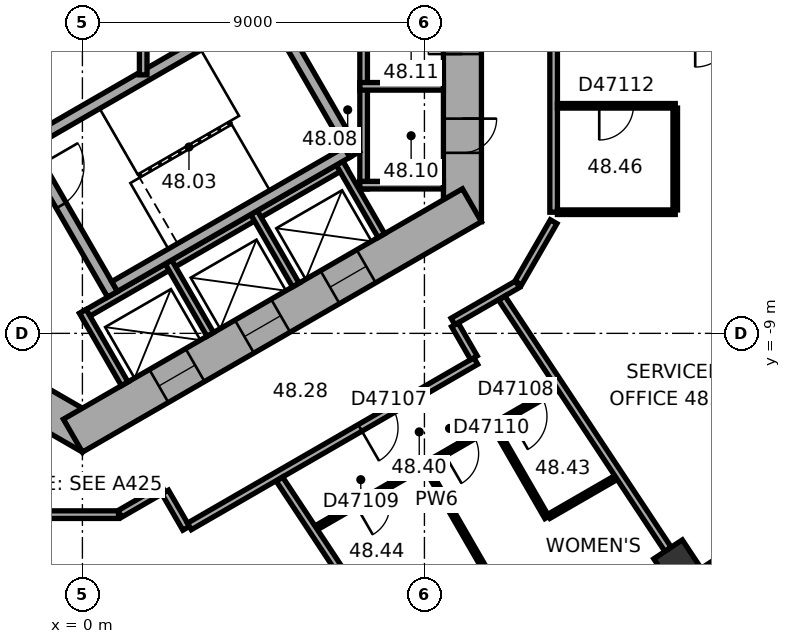
"""IFC4 building model, lengths in metres.
Left out: names, types, materials, properties, quantities, classifications, styles, units other than length and angle.
Written with IfcOpenShell. Run it as: python <this file> out.ifc"""

import sys

from ifc_helpers import new_model, si_unit, direction, frame, frame_2d, origin, origin_2d, place, context, subcontext, project, spatial, rectangle, extrude, element, fill, save


model = new_model("IFC4")
c1 = context("Model", 3, precision=1e-05, world=origin(), true_north=direction((0.0, 1.0)))
c2 = subcontext(c1, "Body", "Model", "MODEL_VIEW")
j1 = project(units=[si_unit("LENGTHUNIT", "METRE"), si_unit("PLANEANGLEUNIT", "RADIAN")], contexts=[c1])
p1 = place(None, origin())
s1 = spatial("IfcSite", under=j1, at=p1, CompositionType="ELEMENT")
p2 = place(p1, origin())
s2 = spatial("IfcBuilding", under=s1, at=p2, CompositionType="ELEMENT")
p3 = place(p2, frame((0.0, 0.0, 194.7)))
s3 = spatial("IfcBuildingStorey", under=s2, at=p3, CompositionType="ELEMENT", Elevation=194.7)
p4 = place(p3, frame((15.659, -15.058, 0.0), z_axis=(0.0, 0.0, 1.0), x_axis=(0.833885822067, 0.551936985312, 0.0)))
e1 = element("IfcColumn", 1, at=p4, inside=s3, PredefinedType="COLUMN", context=c2, shape_type="SweptSolid", body=[
    extrude(rectangle(XDim=0.9, YDim=0.9, at=origin_2d()), origin(), (0.0, 0.0, 1.0), 3.7),
])
p5 = place(p3, frame((10.0, -6.062, 0.0), z_axis=(0.0, 0.0, 1.0), x_axis=(0.0, 1.0, 0.0)))
e2 = element("IfcWall", 2, at=p5, inside=s3, PredefinedType="SHEAR", context=c2, shape_type="SweptSolid", body=[
    extrude(rectangle(XDim=12.125, YDim=1.0, at=frame_2d((6.062, 0.0))), origin(), (0.0, 0.0, 1.0), 3.7),
])
p6 = place(p5, frame((6.262, 0.0, 0.0)))
e3 = element("IfcOpeningElement", 3, at=p6, cuts=e2, PredefinedType="OPENING", context=c2, shape_type="SweptSolid", body=[
    extrude(rectangle(XDim=1.5, YDim=2.1, at=frame_2d((0.75, 1.05))), frame((0.0, 0.51, 0.0), z_axis=(0.0, -1.0, 0.0), x_axis=(1.0, 0.0, 0.0)), (0.0, 0.0, 1.0), 1.02),
])
p7 = place(p5, frame((1.812, 0.0, 0.0)))
e4 = element("IfcOpeningElement", 4, at=p7, cuts=e2, PredefinedType="OPENING", context=c2, shape_type="SweptSolid", body=[
    extrude(rectangle(XDim=0.9, YDim=2.1, at=frame_2d((0.45, 1.05))), frame((0.0, 0.51, 0.0), z_axis=(0.0, -1.0, 0.0), x_axis=(1.0, 0.0, 0.0)), (0.0, 0.0, 1.0), 1.02),
])
p8 = place(p5, frame((4.412, 0.0, 0.0)))
e5 = element("IfcOpeningElement", 5, at=p8, cuts=e2, PredefinedType="OPENING", context=c2, shape_type="SweptSolid", body=[
    extrude(rectangle(XDim=0.9, YDim=2.1, at=frame_2d((0.45, 1.05))), frame((0.0, 0.51, 0.0), z_axis=(0.0, -1.0, 0.0), x_axis=(1.0, 0.0, 0.0)), (0.0, 0.0, 1.0), 1.02),
])
p9 = place(p3, frame((-10.25, -5.629, 0.0), z_axis=(0.0, 0.0, 1.0), x_axis=(0.866022616891, -0.50000482701, 0.0)))
e6 = element("IfcWall", 6, at=p9, inside=s3, PredefinedType="SHEAR", context=c2, shape_type="SweptSolid", body=[
    extrude(rectangle(XDim=12.125, YDim=1.0, at=frame_2d((6.062, 0.0))), origin(), (0.0, 0.0, 1.0), 3.7),
])
p10 = place(p9, frame((6.262, 0.0, 0.0)))
e7 = element("IfcOpeningElement", 7, at=p10, cuts=e6, PredefinedType="OPENING", context=c2, shape_type="SweptSolid", body=[
    extrude(rectangle(XDim=1.5, YDim=2.1, at=frame_2d((0.75, 1.05))), frame((0.0, 0.51, 0.0), z_axis=(0.0, -1.0, 0.0), x_axis=(1.0, 0.0, 0.0)), (0.0, 0.0, 1.0), 1.02),
])
p11 = place(p9, frame((1.712, 0.0, 0.0)))
e8 = element("IfcOpeningElement", 8, at=p11, cuts=e6, PredefinedType="OPENING", context=c2, shape_type="SweptSolid", body=[
    extrude(rectangle(XDim=1.1, YDim=2.1, at=frame_2d((0.55, 1.05))), frame((0.0, 0.51, 0.0), z_axis=(0.0, -1.0, 0.0), x_axis=(1.0, 0.0, 0.0)), (0.0, 0.0, 1.0), 1.02),
])
p12 = place(p9, frame((4.312, 0.0, 0.0)))
e9 = element("IfcOpeningElement", 9, at=p12, cuts=e6, PredefinedType="OPENING", context=c2, shape_type="SweptSolid", body=[
    extrude(rectangle(XDim=1.1, YDim=2.1, at=frame_2d((0.55, 1.05))), frame((0.0, 0.51, 0.0), z_axis=(0.0, -1.0, 0.0), x_axis=(1.0, 0.0, 0.0)), (0.0, 0.0, 1.0), 1.02),
])
p13 = place(p3, frame((-0.25, -11.691, 0.0), z_axis=(0.0, 0.0, 1.0), x_axis=(0.866022616891, 0.50000482701, 0.0)))
e10 = element("IfcWall", 10, at=p13, inside=s3, PredefinedType="SHEAR", context=c2, shape_type="SweptSolid", body=[
    extrude(rectangle(XDim=12.125, YDim=1.0, at=frame_2d((6.062, 0.0))), origin(), (0.0, 0.0, 1.0), 3.7),
])
p14 = place(p13, frame((2.612, 0.0, 0.0)))
e11 = element("IfcOpeningElement", 11, at=p14, cuts=e10, PredefinedType="OPENING", context=c2, shape_type="SweptSolid", body=[
    extrude(rectangle(XDim=1.1, YDim=2.1, at=frame_2d((0.55, 1.05))), frame((0.0, 0.51, 0.0), z_axis=(0.0, -1.0, 0.0), x_axis=(1.0, 0.0, 0.0)), (0.0, 0.0, 1.0), 1.02),
])
p15 = place(p13, frame((5.212, 0.0, 0.0)))
e12 = element("IfcOpeningElement", 12, at=p15, cuts=e10, PredefinedType="OPENING", context=c2, shape_type="SweptSolid", body=[
    extrude(rectangle(XDim=1.1, YDim=2.1, at=frame_2d((0.55, 1.05))), frame((0.0, 0.51, 0.0), z_axis=(0.0, -1.0, 0.0), x_axis=(1.0, 0.0, 0.0)), (0.0, 0.0, 1.0), 1.02),
])
p16 = place(p13, frame((7.812, 0.0, 0.0)))
e13 = element("IfcOpeningElement", 13, at=p16, cuts=e10, PredefinedType="OPENING", context=c2, shape_type="SweptSolid", body=[
    extrude(rectangle(XDim=1.1, YDim=2.1, at=frame_2d((0.55, 1.05))), frame((0.0, 0.51, 0.0), z_axis=(0.0, -1.0, 0.0), x_axis=(1.0, 0.0, 0.0)), (0.0, 0.0, 1.0), 1.02),
])
p17 = place(p3, frame((2.911, -24.156, 0.0), z_axis=(0.0, 0.0, 1.0), x_axis=(0.833882163564, 0.551942512668, 0.0)))
e14 = element("IfcWall", 14, at=p17, inside=s3, PredefinedType="STANDARD", context=c2, shape_type="SweptSolid", body=[
    extrude(rectangle(XDim=20.044, YDim=0.2, at=frame_2d((10.022, 0.0))), origin(), (0.0, 0.0, 1.0), 3.7),
])
p18 = place(p17, frame((1.313, 0.0, 0.9)))
e15 = element("IfcOpeningElement", 15, at=p18, cuts=e14, PredefinedType="OPENING", context=c2, shape_type="SweptSolid", body=[
    extrude(rectangle(XDim=2.4, YDim=2.0, at=frame_2d((1.2, 1.0))), frame((0.0, 0.11, 0.0), z_axis=(0.0, -1.0, 0.0), x_axis=(1.0, 0.0, 0.0)), (0.0, 0.0, 1.0), 0.22),
])
p19 = place(p17, frame((5.067, 0.0, 0.9)))
e16 = element("IfcOpeningElement", 16, at=p19, cuts=e14, PredefinedType="OPENING", context=c2, shape_type="SweptSolid", body=[
    extrude(rectangle(XDim=2.4, YDim=2.0, at=frame_2d((1.2, 1.0))), frame((0.0, 0.11, 0.0), z_axis=(0.0, -1.0, 0.0), x_axis=(1.0, 0.0, 0.0)), (0.0, 0.0, 1.0), 0.22),
])
p20 = place(p17, frame((8.821, 0.0, 0.9)))
e17 = element("IfcOpeningElement", 17, at=p20, cuts=e14, PredefinedType="OPENING", context=c2, shape_type="SweptSolid", body=[
    extrude(rectangle(XDim=2.4, YDim=2.0, at=frame_2d((1.2, 1.0))), frame((0.0, 0.11, 0.0), z_axis=(0.0, -1.0, 0.0), x_axis=(1.0, 0.0, 0.0)), (0.0, 0.0, 1.0), 0.22),
])
p21 = place(p17, frame((12.575, 0.0, 0.9)))
e18 = element("IfcOpeningElement", 18, at=p21, cuts=e14, PredefinedType="OPENING", context=c2, shape_type="SweptSolid", body=[
    extrude(rectangle(XDim=2.4, YDim=2.0, at=frame_2d((1.2, 1.0))), frame((0.0, 0.11, 0.0), z_axis=(0.0, -1.0, 0.0), x_axis=(1.0, 0.0, 0.0)), (0.0, 0.0, 1.0), 0.22),
])
p22 = place(p17, frame((16.329, 0.0, 0.9)))
e19 = element("IfcOpeningElement", 19, at=p22, cuts=e14, PredefinedType="OPENING", context=c2, shape_type="SweptSolid", body=[
    extrude(rectangle(XDim=2.4, YDim=2.0, at=frame_2d((1.2, 1.0))), frame((0.0, 0.11, 0.0), z_axis=(0.0, -1.0, 0.0), x_axis=(1.0, 0.0, 0.0)), (0.0, 0.0, 1.0), 0.22),
])
p23 = place(p3, frame((7.4, -5.2, 0.0), z_axis=(0.0, 0.0, 1.0), x_axis=(0.0, 1.0, 0.0)))
e20 = element("IfcWall", 20, at=p23, inside=s3, PredefinedType="PARTITIONING", context=c2, shape_type="SweptSolid", body=[
    extrude(rectangle(XDim=5.4, YDim=0.2, at=frame_2d((2.7, 0.0))), origin(), (0.0, 0.0, 1.0), 3.42),
])
for number, where, z_axis, x_axis in (
    (21, (7.3, -5.1, 0.0), (0.0, 0.0, 1.0), (1.0, 0.0, 0.0)),
    (22, (7.3, -2.5, 0.0), (0.0, 0.0, 1.0), (1.0, 0.0, 0.0)),
):
    element("IfcWall", number, at=place(p3, frame(where, z_axis=z_axis, x_axis=x_axis)), inside=s3, PredefinedType="PARTITIONING", context=c2, shape_type="SweptSolid", body=[
        extrude(rectangle(XDim=2.2, YDim=0.2, at=frame_2d((1.1, 0.0))), origin(), (0.0, 0.0, 1.0), 3.42),
    ])
p24 = place(p3, frame((-0.024, -8.559, 0.0), z_axis=(0.0, 0.0, 1.0), x_axis=(0.866026010844, 0.49999894854, 0.0)))
e23 = element("IfcWall", 23, at=p24, inside=s3, PredefinedType="PARTITIONING", context=c2, shape_type="SweptSolid", body=[
    extrude(rectangle(XDim=8.0, YDim=0.2, at=frame_2d((4.0, 0.0))), origin(), (0.0, 0.0, 1.0), 3.42),
])
for number, where, z_axis, x_axis in (
    (24, (0.013, -8.422, 0.0), (0.0, 0.0, 1.0), (0.5, -0.866, 0.0)),
    (25, (2.264, -7.122, 0.0), (0.0, 0.0, 1.0), (0.5, -0.866, 0.0)),
    (26, (4.516, -5.822, 0.0), (0.0, 0.0, 1.0), (0.5, -0.866, 0.0)),
    (27, (6.768, -4.522, 0.0), (0.0, 0.0, 1.0), (0.5, -0.866, 0.0)),
):
    element("IfcWall", number, at=place(p3, frame(where, z_axis=z_axis, x_axis=x_axis)), inside=s3, PredefinedType="PARTITIONING", context=c2, shape_type="SweptSolid", body=[
        extrude(rectangle(XDim=2.2, YDim=0.2, at=frame_2d((1.1, 0.0))), origin(), (0.0, 0.0, 1.0), 3.42),
    ])
p25 = place(p3, frame((-1.558, -3.902, 0.0), z_axis=(0.0, 0.0, 1.0), x_axis=(0.499977259774, -0.866038532462, 0.0)))
e28 = element("IfcWall", 28, at=p25, inside=s3, PredefinedType="SHEAR", context=c2, shape_type="SweptSolid", body=[
    extrude(rectangle(XDim=4.7, YDim=0.3, at=frame_2d((2.35, 0.0))), origin(), (0.0, 0.0, 1.0), 3.42),
])
p26 = place(p25, frame((0.8, 0.0, 0.0)))
e29 = element("IfcOpeningElement", 29, at=p26, cuts=e28, PredefinedType="OPENING", context=c2, shape_type="SweptSolid", body=[
    extrude(rectangle(XDim=1.2, YDim=2.1, at=frame_2d((0.6, 1.05))), frame((0.0, 0.16, 0.0), z_axis=(0.0, -1.0, 0.0), x_axis=(1.0, 0.0, 0.0)), (0.0, 0.0, 1.0), 0.32),
])
p27 = place(p3, frame((4.816, -0.222, 0.0), z_axis=(0.0, 0.0, 1.0), x_axis=(0.499977259774, -0.866038532462, 0.0)))
e30 = element("IfcWall", 30, at=p27, inside=s3, PredefinedType="SHEAR", context=c2, shape_type="SweptSolid", body=[
    extrude(rectangle(XDim=4.7, YDim=0.3, at=frame_2d((2.35, 0.0))), origin(), (0.0, 0.0, 1.0), 3.42),
])
for number, where, z_axis, x_axis in (
    (31, (-1.353, -3.957, 0.0), (0.0, 0.0, 1.0), (0.866, 0.5, 0.0)),
    (32, (0.847, -7.767, 0.0), (0.0, 0.0, 1.0), (0.866, 0.5, 0.0)),
):
    element("IfcWall", number, at=place(p3, frame(where, z_axis=z_axis, x_axis=x_axis)), inside=s3, PredefinedType="SHEAR", context=c2, shape_type="SweptSolid", body=[
        extrude(rectangle(XDim=7.06, YDim=0.3, at=frame_2d((3.53, 0.0))), origin(), (0.0, 0.0, 1.0), 3.42),
    ])
p28 = place(p3, frame((1.6, -2.198, 0.0), z_axis=(0.0, 0.0, 1.0), x_axis=(0.0, 1.0, 0.0)))
e33 = element("IfcWall", 33, at=p28, inside=s3, PredefinedType="PARTITIONING", context=c2, shape_type="SweptSolid", body=[
    extrude(rectangle(XDim=4.397, YDim=0.2, at=frame_2d((2.198, 0.0))), origin(), (0.0, 0.0, 1.0), 3.42),
])
p29 = place(p3, frame((-0.91, -13.77, 0.0), z_axis=(0.0, 0.0, 1.0), x_axis=(1.0, 0.0, 0.0)))
e34 = element("IfcWall", 34, at=p29, inside=s3, PredefinedType="PARTITIONING", context=c2, shape_type="SweptSolid", body=[
    extrude(rectangle(XDim=1.86, YDim=0.2, at=frame_2d((0.93, 0.0))), origin(), (0.0, 0.0, 1.0), 3.42),
])
p30 = place(p3, frame((0.985, -13.75, 0.0), z_axis=(0.0, 0.0, 1.0), x_axis=(0.866028661061, 0.499994358189, 0.0)))
e35 = element("IfcWall", 35, at=p30, inside=s3, PredefinedType="PARTITIONING", context=c2, shape_type="SweptSolid", body=[
    extrude(rectangle(XDim=1.321, YDim=0.2, at=frame_2d((0.661, 0.0))), origin(), (0.0, 0.0, 1.0), 3.42),
])
p31 = place(p3, frame((2.179, -13.176, 0.0), z_axis=(0.0, 0.0, 1.0), x_axis=(0.499978356969, -0.866037899034, 0.0)))
e36 = element("IfcWall", 36, at=p31, inside=s3, PredefinedType="PARTITIONING", context=c2, shape_type="SweptSolid", body=[
    extrude(rectangle(XDim=1.101, YDim=0.2, at=frame_2d((0.551, 0.0))), origin(), (0.0, 0.0, 1.0), 3.42),
])
p32 = place(p3, frame((2.816, -14.079, 0.0), z_axis=(0.0, 0.0, 1.0), x_axis=(0.866021128829, 0.500007404367, 0.0)))
e37 = element("IfcWall", 37, at=p32, inside=s3, PredefinedType="PARTITIONING", context=c2, shape_type="SweptSolid", body=[
    extrude(rectangle(XDim=8.702, YDim=0.2, at=frame_2d((4.351, 0.0))), origin(), (0.0, 0.0, 1.0), 3.42),
])
p33 = place(p32, frame((5.184, 0.0, 0.0)))
e38 = element("IfcOpeningElement", 38, at=p33, cuts=e37, PredefinedType="OPENING", context=c2, shape_type="SweptSolid", body=[
    extrude(rectangle(XDim=1.0, YDim=2.1, at=frame_2d((0.5, 1.05))), frame((0.0, 0.11, 0.0), z_axis=(0.0, -1.0, 0.0), x_axis=(1.0, 0.0, 0.0)), (0.0, 0.0, 1.0), 0.22),
])
p34 = place(p3, frame((6.152, -14.116, 0.0), z_axis=(0.0, 0.0, 1.0), x_axis=(0.866026788224, 0.499997602072, 0.0)))
e39 = element("IfcWall", 39, at=p34, inside=s3, PredefinedType="PARTITIONING", context=c2, shape_type="SweptSolid", body=[
    extrude(rectangle(XDim=7.322, YDim=0.12, at=frame_2d((3.661, 0.0))), origin(), (0.0, 0.0, 1.0), 3.42),
])
p35 = place(p34, frame((5.858, 0.0, 0.0)))
e40 = element("IfcOpeningElement", 40, at=p35, cuts=e39, PredefinedType="OPENING", context=c2, shape_type="SweptSolid", body=[
    extrude(rectangle(XDim=1.0, YDim=2.1, at=frame_2d((0.5, 1.05))), frame((0.0, 0.07, 0.0), z_axis=(0.0, -1.0, 0.0), x_axis=(1.0, 0.0, 0.0)), (0.0, 0.0, 1.0), 0.14),
])
p36 = place(p34, frame((1.2, 0.0, 0.0)))
e41 = element("IfcOpeningElement", 41, at=p36, cuts=e39, PredefinedType="OPENING", context=c2, shape_type="SweptSolid", body=[
    extrude(rectangle(XDim=0.9, YDim=2.1, at=frame_2d((0.45, 1.05))), frame((0.0, 0.07, 0.0), z_axis=(0.0, -1.0, 0.0), x_axis=(1.0, 0.0, 0.0)), (0.0, 0.0, 1.0), 0.14),
])
p37 = place(p34, frame((3.897, 0.0, 0.0)))
e42 = element("IfcOpeningElement", 42, at=p37, cuts=e39, PredefinedType="OPENING", context=c2, shape_type="SweptSolid", body=[
    extrude(rectangle(XDim=0.9, YDim=2.1, at=frame_2d((0.45, 1.05))), frame((0.0, 0.07, 0.0), z_axis=(0.0, -1.0, 0.0), x_axis=(1.0, 0.0, 0.0)), (0.0, 0.0, 1.0), 0.14),
])
p38 = place(p3, frame((9.15, -18.827, 0.0), z_axis=(0.0, 0.0, 1.0), x_axis=(-0.551928083938, 0.83389171369, 0.0)))
e43 = element("IfcWall", 43, at=p38, inside=s3, PredefinedType="PARTITIONING", context=c2, shape_type="SweptSolid", body=[
    extrude(rectangle(XDim=7.182, YDim=0.2, at=frame_2d((3.591, 0.0))), origin(), (0.0, 0.0, 1.0), 2.87),
])
p39 = place(p3, frame((9.752, -8.688, 0.0), z_axis=(0.0, 0.0, 1.0), x_axis=(0.865974105138, 0.500088841337, 0.0)))
e44 = element("IfcWall", 44, at=p39, inside=s3, PredefinedType="PARTITIONING", context=c2, shape_type="SweptSolid", body=[
    extrude(rectangle(XDim=1.961, YDim=0.2, at=frame_2d((0.98, 0.0))), origin(), (0.0, 0.0, 1.0), 3.42),
])
p40 = place(p3, frame((10.302, -9.642, 0.0), z_axis=(0.0, 0.0, 1.0), x_axis=(-0.500074377092, 0.865982457891, 0.0)))
e45 = element("IfcWall", 45, at=p40, inside=s3, PredefinedType="PARTITIONING", context=c2, shape_type="SweptSolid", body=[
    extrude(rectangle(XDim=1.001, YDim=0.2, at=frame_2d((0.5, 0.0))), origin(), (0.0, 0.0, 1.0), 3.42),
])
p41 = place(p3, frame((10.853, -11.472, 0.0), z_axis=(0.0, 0.0, 1.0), x_axis=(0.500048966069, -0.865997131366, 0.0)))
e46 = element("IfcWall", 46, at=p41, inside=s3, PredefinedType="PARTITIONING", context=c2, shape_type="SweptSolid", body=[
    extrude(rectangle(XDim=2.74, YDim=0.12, at=frame_2d((1.37, 0.0))), origin(), (0.0, 0.0, 1.0), 3.42),
])
p42 = place(p3, frame((11.47, -7.673, 0.0), z_axis=(0.0, 0.0, 1.0), x_axis=(0.499964847546, 0.866045698112, 0.0)))
e47 = element("IfcWall", 47, at=p42, inside=s3, PredefinedType="PARTITIONING", context=c2, shape_type="SweptSolid", body=[
    extrude(rectangle(XDim=1.86, YDim=0.2, at=frame_2d((0.93, 0.0))), origin(), (0.0, 0.0, 1.0), 3.42),
])
p43 = place(p3, frame((11.705, -17.136, 0.0), z_axis=(0.0, 0.0, 1.0), x_axis=(-0.499985382219, 0.8660338432, 0.0)))
e48 = element("IfcWall", 48, at=p43, inside=s3, PredefinedType="PARTITIONING", context=c2, shape_type="SweptSolid", body=[
    extrude(rectangle(XDim=5.332, YDim=0.12, at=frame_2d((2.666, 0.0))), origin(), (0.0, 0.0, 1.0), 3.42),
])
p44 = place(p3, frame((12.275, -13.814, 0.0), z_axis=(0.0, 0.0, 1.0), x_axis=(0.866010195725, 0.500026340207, 0.0)))
e49 = element("IfcWall", 49, at=p44, inside=s3, PredefinedType="PARTITIONING", context=c2, shape_type="SweptSolid", body=[
    extrude(rectangle(XDim=2.04, YDim=0.12, at=frame_2d((1.02, 0.0))), origin(), (0.0, 0.0, 1.0), 3.42),
])
p45 = place(p3, frame((12.4, -5.812, 0.0), z_axis=(0.0, 0.0, 1.0), x_axis=(0.0, 1.0, 0.0)))
e50 = element("IfcWall", 50, at=p45, inside=s3, PredefinedType="PARTITIONING", context=c2, shape_type="SweptSolid", body=[
    extrude(rectangle(XDim=4.819, YDim=0.2, at=frame_2d((2.41, 0.0))), origin(), (0.0, 0.0, 1.0), 3.42),
])
p46 = place(p3, frame((12.5, -3.012, 0.0), z_axis=(0.0, 0.0, 1.0), x_axis=(1.0, 0.0, 0.0)))
e51 = element("IfcWall", 51, at=p46, inside=s3, PredefinedType="PARTITIONING", context=c2, shape_type="SweptSolid", body=[
    extrude(rectangle(XDim=3.1, YDim=0.12, at=frame_2d((1.55, 0.0))), origin(), (0.0, 0.0, 1.0), 3.42),
])
p47 = place(p46, frame((1.1, 0.0, 0.0)))
e52 = element("IfcOpeningElement", 52, at=p47, cuts=e51, PredefinedType="OPENING", context=c2, shape_type="SweptSolid", body=[
    extrude(rectangle(XDim=0.9, YDim=2.1, at=frame_2d((0.45, 1.05))), frame((0.0, 0.07, 0.0), z_axis=(0.0, -1.0, 0.0), x_axis=(1.0, 0.0, 0.0)), (0.0, 0.0, 1.0), 0.14),
])
p48 = place(p3, frame((15.411, -14.683, 0.0), z_axis=(0.0, 0.0, 1.0), x_axis=(-0.551932106251, 0.833889051427, 0.0)))
e53 = element("IfcWall", 53, at=p48, inside=s3, PredefinedType="PARTITIONING", context=c2, shape_type="SweptSolid", body=[
    extrude(rectangle(XDim=7.926, YDim=0.2, at=frame_2d((3.963, 0.0))), origin(), (0.0, 0.0, 1.0), 2.87),
])
p49 = place(p3, frame((15.6, -5.812, 0.0), z_axis=(0.0, 0.0, 1.0), x_axis=(-1.0, 0.0, 0.0)))
e54 = element("IfcWall", 54, at=p49, inside=s3, PredefinedType="PARTITIONING", context=c2, shape_type="SweptSolid", body=[
    extrude(rectangle(XDim=3.1, YDim=0.12, at=frame_2d((1.55, 0.0))), origin(), (0.0, 0.0, 1.0), 3.42),
])
p50 = place(p3, frame((15.6, -3.072, 0.0), z_axis=(0.0, 0.0, 1.0), x_axis=(0.0, -1.0, 0.0)))
e55 = element("IfcWall", 55, at=p50, inside=s3, PredefinedType="PARTITIONING", context=c2, shape_type="SweptSolid", body=[
    extrude(rectangle(XDim=2.68, YDim=0.12, at=frame_2d((1.34, 0.0))), origin(), (0.0, 0.0, 1.0), 3.42),
])
p51 = place(p22, origin())
e56 = element("IfcWindow", 56, at=p51, inside=s3, PartitioningType="SINGLE_PANEL", PredefinedType="WINDOW", context=c2, shape_type="SweptSolid", body=[
    extrude(rectangle(XDim=2.4, YDim=2.0, at=frame_2d((1.2, 1.0))), frame((0.0, 0.03, 0.0), z_axis=(0.0, -1.0, 0.0), x_axis=(1.0, 0.0, 0.0)), (0.0, 0.0, 1.0), 0.06),
])
fill(e19, e56)
p52 = place(p26, origin())
e57 = element("IfcDoor", 57, at=p52, inside=s3, OperationType="SINGLE_SWING_RIGHT", PredefinedType="DOOR", context=c2, shape_type="SweptSolid", body=[
    extrude(rectangle(XDim=1.2, YDim=2.1, at=frame_2d((0.6, 1.05))), frame((0.0, 0.025, 0.0), z_axis=(0.0, -1.0, 0.0), x_axis=(1.0, 0.0, 0.0)), (0.0, 0.0, 1.0), 0.05),
])
fill(e29, e57)
p53 = place(p7, origin())
e58 = element("IfcDoor", 58, at=p53, inside=s3, OperationType="SINGLE_SWING_LEFT", PredefinedType="DOOR", context=c2, shape_type="SweptSolid", body=[
    extrude(rectangle(XDim=0.9, YDim=2.1, at=frame_2d((0.45, 1.05))), frame((0.0, 0.025, 0.0), z_axis=(0.0, -1.0, 0.0), x_axis=(1.0, 0.0, 0.0)), (0.0, 0.0, 1.0), 0.05),
])
fill(e4, e58)
p54 = place(p8, origin())
e59 = element("IfcDoor", 59, at=p54, inside=s3, OperationType="SINGLE_SWING_LEFT", PredefinedType="DOOR", context=c2, shape_type="SweptSolid", body=[
    extrude(rectangle(XDim=0.9, YDim=2.1, at=frame_2d((0.45, 1.05))), frame((0.0, 0.025, 0.0), z_axis=(0.0, -1.0, 0.0), x_axis=(1.0, 0.0, 0.0)), (0.0, 0.0, 1.0), 0.05),
])
fill(e5, e59)
p55 = place(p14, origin())
e60 = element("IfcDoor", 60, at=p55, inside=s3, OperationType="DOUBLE_DOOR_SLIDING", PredefinedType="DOOR", context=c2, shape_type="SweptSolid", body=[
    extrude(rectangle(XDim=1.1, YDim=2.1, at=frame_2d((0.55, 1.05))), frame((0.0, 0.025, 0.0), z_axis=(0.0, -1.0, 0.0), x_axis=(1.0, 0.0, 0.0)), (0.0, 0.0, 1.0), 0.05),
])
fill(e11, e60)
p56 = place(p15, origin())
e61 = element("IfcDoor", 61, at=p56, inside=s3, OperationType="DOUBLE_DOOR_SLIDING", PredefinedType="DOOR", context=c2, shape_type="SweptSolid", body=[
    extrude(rectangle(XDim=1.1, YDim=2.1, at=frame_2d((0.55, 1.05))), frame((0.0, 0.025, 0.0), z_axis=(0.0, -1.0, 0.0), x_axis=(1.0, 0.0, 0.0)), (0.0, 0.0, 1.0), 0.05),
])
fill(e12, e61)
p57 = place(p16, origin())
e62 = element("IfcDoor", 62, at=p57, inside=s3, OperationType="DOUBLE_DOOR_SLIDING", PredefinedType="DOOR", context=c2, shape_type="SweptSolid", body=[
    extrude(rectangle(XDim=1.1, YDim=2.1, at=frame_2d((0.55, 1.05))), frame((0.0, 0.025, 0.0), z_axis=(0.0, -1.0, 0.0), x_axis=(1.0, 0.0, 0.0)), (0.0, 0.0, 1.0), 0.05),
])
fill(e13, e62)
p58 = place(p33, origin())
e63 = element("IfcDoor", 63, at=p58, inside=s3, OperationType="SINGLE_SWING_LEFT", PredefinedType="DOOR", context=c2, shape_type="SweptSolid", body=[
    extrude(rectangle(XDim=1.0, YDim=2.1, at=frame_2d((0.5, 1.05))), frame((0.0, 0.025, 0.0), z_axis=(0.0, -1.0, 0.0), x_axis=(1.0, 0.0, 0.0)), (0.0, 0.0, 1.0), 0.05),
])
fill(e38, e63)
p59 = place(p35, origin())
e64 = element("IfcDoor", 64, at=p59, inside=s3, OperationType="SINGLE_SWING_LEFT", PredefinedType="DOOR", context=c2, shape_type="SweptSolid", body=[
    extrude(rectangle(XDim=1.0, YDim=2.1, at=frame_2d((0.5, 1.05))), frame((0.0, 0.025, 0.0), z_axis=(0.0, -1.0, 0.0), x_axis=(1.0, 0.0, 0.0)), (0.0, 0.0, 1.0), 0.05),
])
fill(e40, e64)
p60 = place(p36, origin())
e65 = element("IfcDoor", 65, at=p60, inside=s3, OperationType="SINGLE_SWING_LEFT", PredefinedType="DOOR", context=c2, shape_type="SweptSolid", body=[
    extrude(rectangle(XDim=0.9, YDim=2.1, at=frame_2d((0.45, 1.05))), frame((0.0, 0.025, 0.0), z_axis=(0.0, -1.0, 0.0), x_axis=(1.0, 0.0, 0.0)), (0.0, 0.0, 1.0), 0.05),
])
fill(e41, e65)
p61 = place(p37, origin())
e66 = element("IfcDoor", 66, at=p61, inside=s3, OperationType="SINGLE_SWING_LEFT", PredefinedType="DOOR", context=c2, shape_type="SweptSolid", body=[
    extrude(rectangle(XDim=0.9, YDim=2.1, at=frame_2d((0.45, 1.05))), frame((0.0, 0.025, 0.0), z_axis=(0.0, -1.0, 0.0), x_axis=(1.0, 0.0, 0.0)), (0.0, 0.0, 1.0), 0.05),
])
fill(e42, e66)
p62 = place(p47, origin())
e67 = element("IfcDoor", 67, at=p62, inside=s3, OperationType="SINGLE_SWING_LEFT", PredefinedType="DOOR", context=c2, shape_type="SweptSolid", body=[
    extrude(rectangle(XDim=0.9, YDim=2.1, at=frame_2d((0.45, 1.05))), frame((0.0, 0.025, 0.0), z_axis=(0.0, -1.0, 0.0), x_axis=(1.0, 0.0, 0.0)), (0.0, 0.0, 1.0), 0.05),
])
fill(e52, e67)
save(model, sys.argv[1])
